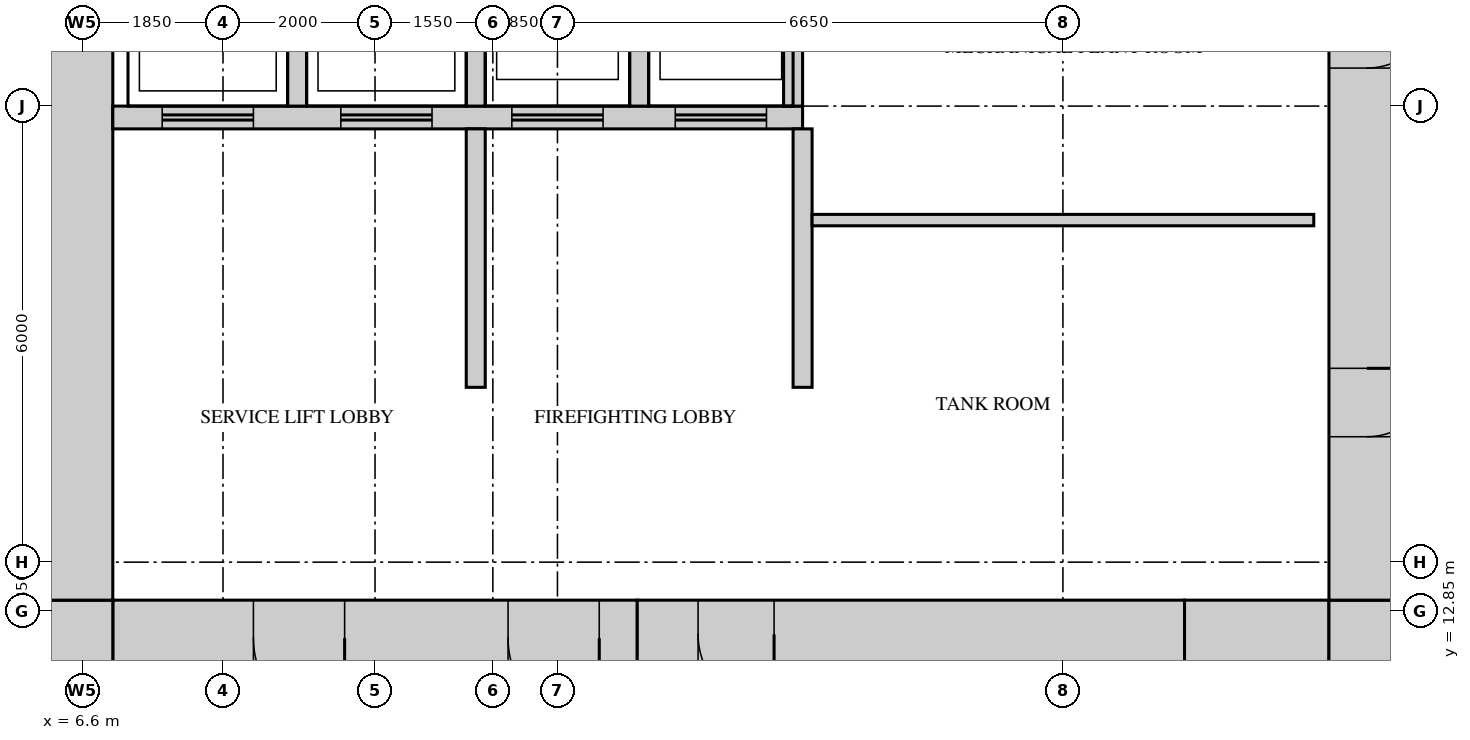
"""IFC4 building model, lengths in metres.
Left out: names, types, materials, properties, quantities, classifications, styles, units other than length and angle.
Written with IfcOpenShell. Run it as: python <this file> out.ifc"""

import sys

from ifc_helpers import new_model, si_unit, direction, frame, frame_2d, origin, place, context, subcontext, project, spatial, rectangle, extrude, source, transform, mapped, element, fill, save


model = new_model("IFC4")
c1 = context("Model", 3, precision=1e-05, world=origin(), true_north=direction((0.0, 1.0)))
c2 = subcontext(c1, "Body", "Model", "MODEL_VIEW")
j1 = project(units=[si_unit("LENGTHUNIT", "METRE"), si_unit("PLANEANGLEUNIT", "RADIAN")], contexts=[c1])
p1 = place(None, origin())
s1 = spatial("IfcSite", under=j1, at=p1, CompositionType="ELEMENT")
p2 = place(p1, origin())
s2 = spatial("IfcBuilding", under=s1, at=p2, CompositionType="ELEMENT")
p3 = place(p2, frame((0.0, 0.0, 114.7)))
s3 = spatial("IfcBuildingStorey", under=s2, at=p3, CompositionType="ELEMENT", Elevation=114.7)
m1 = source(origin(), c2, "Body", "SweptSolid", [
    extrude(rectangle(XDim=6.9, YDim=1.0, at=frame_2d((3.45, 0.0))), origin(), (0.0, 0.0, 1.0), 4.1),
])
p4 = place(p3, frame((7.0, 12.5, 0.0), z_axis=(0.0, 0.0, 1.0), x_axis=(1.0, 0.0, 0.0)))
e1 = element("IfcWall", 1, at=p4, inside=s3, PredefinedType="SHEAR", context=c2, shape_type="MappedRepresentation", body=[
    mapped(m1, transform((0.0, 0.0, 0.0))),
])
m2 = source(origin(), c2, "Body", "SweptSolid", [
    extrude(rectangle(XDim=1.2, YDim=2.1, at=frame_2d((0.6, 1.05))), frame((0.0, 0.51, 0.0), z_axis=(0.0, -1.0, 0.0), x_axis=(1.0, 0.0, 0.0)), (0.0, 0.0, 1.0), 1.02),
])
p5 = place(p4, frame((5.2, 0.0, 0.0)))
e2 = element("IfcOpeningElement", 2, at=p5, cuts=e1, PredefinedType="OPENING", context=c2, shape_type="MappedRepresentation", body=[
    mapped(m2, transform((0.0, 0.0, 0.0))),
])
p6 = place(p4, frame((1.85, 0.0, 0.0)))
e3 = element("IfcOpeningElement", 3, at=p6, cuts=e1, PredefinedType="OPENING", context=c2, shape_type="MappedRepresentation", body=[
    mapped(m2, transform((0.0, 0.0, 0.0))),
])
m3 = source(origin(), c2, "Body", "SweptSolid", [
    extrude(rectangle(XDim=7.2, YDim=0.9, at=frame_2d((3.6, 0.0))), origin(), (0.0, 0.0, 1.0), 4.1),
])
p7 = place(p3, frame((13.9, 12.55, 0.0), z_axis=(0.0, 0.0, 1.0), x_axis=(1.0, 0.0, 0.0)))
e4 = element("IfcWall", 4, at=p7, inside=s3, PredefinedType="SHEAR", context=c2, shape_type="MappedRepresentation", body=[
    mapped(m3, transform((0.0, 0.0, 0.0))),
])
m4 = source(origin(), c2, "Body", "SweptSolid", [
    extrude(rectangle(XDim=1.0, YDim=2.1, at=frame_2d((0.5, 1.05))), frame((0.0, 0.46, 0.0), z_axis=(0.0, -1.0, 0.0), x_axis=(1.0, 0.0, 0.0)), (0.0, 0.0, 1.0), 0.92),
])
p8 = place(p7, frame((0.8, 0.0, 0.0)))
e5 = element("IfcOpeningElement", 5, at=p8, cuts=e4, PredefinedType="OPENING", context=c2, shape_type="MappedRepresentation", body=[
    mapped(m4, transform((0.0, 0.0, 0.0))),
])
m5 = source(origin(), c2, "Body", "SweptSolid", [
    extrude(rectangle(XDim=1.9, YDim=1.0, at=frame_2d((0.95, 0.0))), origin(), (0.0, 0.0, 1.0), 4.1),
])
p9 = place(p3, frame((21.1, 12.5, 0.0), z_axis=(0.0, 0.0, 1.0), x_axis=(1.0, 0.0, 0.0)))
e6 = element("IfcWall", 6, at=p9, inside=s3, PredefinedType="SHEAR", context=c2, shape_type="MappedRepresentation", body=[
    mapped(m5, transform((0.0, 0.0, 0.0))),
])
m6 = source(origin(), c2, "Body", "SweptSolid", [
    extrude(rectangle(XDim=1.0, YDim=1.0, at=frame_2d((0.5, 0.0))), origin(), (0.0, 0.0, 1.0), 4.1),
])
for number, where, z_axis, x_axis in (
    (7, (23.0, 12.5, 0.0), (0.0, 0.0, 1.0), (1.0, 0.0, 0.0)),
    (8, (6.0, 12.5, 0.0), (0.0, 0.0, 1.0), (1.0, 0.0, 0.0)),
):
    element("IfcWall", number, at=place(p3, frame(where, z_axis=z_axis, x_axis=x_axis)), inside=s3, PredefinedType="SHEAR", context=c2, shape_type="MappedRepresentation", body=[
        mapped(m6, transform((0.0, 0.0, 0.0))),
    ])
m7 = source(origin(), c2, "Body", "SweptSolid", [
    extrude(rectangle(XDim=28.0, YDim=1.0, at=frame_2d((14.0, 0.0))), origin(), (0.0, 0.0, 1.0), 4.1),
])
p10 = place(p3, frame((23.5, 13.0, 0.0), z_axis=(0.0, 0.0, 1.0), x_axis=(0.0, 1.0, 0.0)))
e9 = element("IfcWall", 9, at=p10, inside=s3, PredefinedType="SHEAR", context=c2, shape_type="MappedRepresentation", body=[
    mapped(m7, transform((0.0, 0.0, 0.0))),
])
m8 = source(origin(), c2, "Body", "SweptSolid", [
    extrude(rectangle(XDim=1.8, YDim=2.1, at=frame_2d((0.9, 1.05))), frame((0.0, 0.51, 0.0), z_axis=(0.0, -1.0, 0.0), x_axis=(1.0, 0.0, 0.0)), (0.0, 0.0, 1.0), 1.02),
])
p11 = place(p10, frame((22.6, 0.0, 0.0)))
e10 = element("IfcOpeningElement", 10, at=p11, cuts=e9, PredefinedType="OPENING", context=c2, shape_type="MappedRepresentation", body=[
    mapped(m8, transform((0.0, 0.0, 0.0))),
])
p12 = place(p10, frame((13.85, 0.0, 0.0)))
e11 = element("IfcOpeningElement", 11, at=p12, cuts=e9, PredefinedType="OPENING", context=c2, shape_type="MappedRepresentation", body=[
    mapped(m2, transform((0.0, 0.0, 0.0))),
])
m9 = source(origin(), c2, "Body", "SweptSolid", [
    extrude(rectangle(XDim=0.9, YDim=2.1, at=frame_2d((0.45, 1.05))), frame((0.0, 0.51, 0.0), z_axis=(0.0, -1.0, 0.0), x_axis=(1.0, 0.0, 0.0)), (0.0, 0.0, 1.0), 1.02),
])
p13 = place(p10, frame((2.15, 0.0, 0.0)))
e12 = element("IfcOpeningElement", 12, at=p13, cuts=e9, PredefinedType="OPENING", context=c2, shape_type="MappedRepresentation", body=[
    mapped(m9, transform((0.0, 0.0, 0.0))),
])
p14 = place(p10, frame((7.0, 0.0, 0.0)))
e13 = element("IfcOpeningElement", 13, at=p14, cuts=e9, PredefinedType="OPENING", context=c2, shape_type="MappedRepresentation", body=[
    mapped(m9, transform((0.0, 0.0, 0.0))),
])
p15 = place(p3, frame((6.5, 13.0, 0.0), z_axis=(0.0, 0.0, 1.0), x_axis=(0.0, 1.0, 0.0)))
e14 = element("IfcWall", 14, at=p15, inside=s3, PredefinedType="SHEAR", context=c2, shape_type="MappedRepresentation", body=[
    mapped(m7, transform((0.0, 0.0, 0.0))),
])
m10 = source(origin(), c2, "Body", "SweptSolid", [
    extrude(rectangle(XDim=9.075, YDim=0.3, at=frame_2d((4.538, 0.0))), origin(), (0.0, 0.0, 1.0), 4.1),
])
p16 = place(p3, frame((7.0, 19.35, 0.0), z_axis=(0.0, 0.0, 1.0), x_axis=(1.0, 0.0, 0.0)))
e15 = element("IfcWall", 15, at=p16, inside=s3, PredefinedType="STANDARD", context=c2, shape_type="MappedRepresentation", body=[
    mapped(m10, transform((0.0, 0.0, 0.0))),
])
m11 = source(origin(), c2, "Body", "SweptSolid", [
    extrude(rectangle(XDim=1.2, YDim=2.1, at=frame_2d((0.6, 1.05))), frame((0.0, 0.16, 0.0), z_axis=(0.0, -1.0, 0.0), x_axis=(1.0, 0.0, 0.0)), (0.0, 0.0, 1.0), 0.32),
])
p17 = place(p16, frame((0.65, 0.0, 0.0)))
e16 = element("IfcOpeningElement", 16, at=p17, cuts=e15, PredefinedType="OPENING", context=c2, shape_type="MappedRepresentation", body=[
    mapped(m11, transform((0.0, 0.0, 0.0))),
])
p18 = place(p16, frame((3.0, 0.0, 0.0)))
e17 = element("IfcOpeningElement", 17, at=p18, cuts=e15, PredefinedType="OPENING", context=c2, shape_type="MappedRepresentation", body=[
    mapped(m11, transform((0.0, 0.0, 0.0))),
])
p19 = place(p16, frame((5.25, 0.0, 0.0)))
e18 = element("IfcOpeningElement", 18, at=p19, cuts=e15, PredefinedType="OPENING", context=c2, shape_type="MappedRepresentation", body=[
    mapped(m11, transform((0.0, 0.0, 0.0))),
])
p20 = place(p16, frame((7.4, 0.0, 0.0)))
e19 = element("IfcOpeningElement", 19, at=p20, cuts=e15, PredefinedType="OPENING", context=c2, shape_type="MappedRepresentation", body=[
    mapped(m11, transform((0.0, 0.0, 0.0))),
])
m12 = source(origin(), c2, "Body", "SweptSolid", [
    extrude(rectangle(XDim=3.1, YDim=0.25, at=frame_2d((1.55, 0.0))), origin(), (0.0, 0.0, 1.0), 4.1),
])
for number, where, z_axis, x_axis in (
    (20, (9.425, 19.5, 0.0), (0.0, 0.0, 1.0), (0.0, 1.0, 0.0)),
    (21, (11.775, 19.5, 0.0), (0.0, 0.0, 1.0), (0.0, 1.0, 0.0)),
    (22, (13.925, 19.5, 0.0), (0.0, 0.0, 1.0), (0.0, 1.0, 0.0)),
    (23, (15.95, 19.5, 0.0), (0.0, 0.0, 1.0), (0.0, 1.0, 0.0)),
):
    element("IfcWall", number, at=place(p3, frame(where, z_axis=z_axis, x_axis=x_axis)), inside=s3, PredefinedType="STANDARD", context=c2, shape_type="MappedRepresentation", body=[
        mapped(m12, transform((0.0, 0.0, 0.0))),
    ])
m13 = source(origin(), c2, "Body", "SweptSolid", [
    extrude(rectangle(XDim=3.4, YDim=0.25, at=frame_2d((1.7, 0.0))), origin(), (0.0, 0.0, 1.0), 4.1),
])
for number, where, z_axis, x_axis in (
    (24, (16.075, 15.8, 0.0), (0.0, 0.0, 1.0), (0.0, 1.0, 0.0)),
    (25, (11.775, 15.8, 0.0), (0.0, 0.0, 1.0), (0.0, 1.0, 0.0)),
):
    element("IfcWall", number, at=place(p3, frame(where, z_axis=z_axis, x_axis=x_axis)), inside=s3, PredefinedType="STANDARD", context=c2, shape_type="MappedRepresentation", body=[
        mapped(m13, transform((0.0, 0.0, 0.0))),
    ])
m14 = source(origin(), c2, "Body", "SweptSolid", [
    extrude(rectangle(XDim=6.6, YDim=0.15, at=frame_2d((3.3, 0.0))), origin(), (0.0, 0.0, 1.0), 4.2),
])
p21 = place(p3, frame((16.2, 18.0, 0.0), z_axis=(0.0, 0.0, 1.0), x_axis=(1.0, 0.0, 0.0)))
e26 = element("IfcWall", 26, at=p21, inside=s3, PredefinedType="PARTITIONING", context=c2, shape_type="MappedRepresentation", body=[
    mapped(m14, transform((0.0, 0.0, 0.0))),
])
m15 = source(origin(), c2, "Body", "SweptSolid", [
    extrude(rectangle(XDim=0.9, YDim=2.1, at=frame_2d((0.45, 1.05))), frame((0.0, 0.45, 0.0), z_axis=(0.0, -1.0, 0.0), x_axis=(1.0, 0.0, 0.0)), (0.0, 0.0, 1.0), 0.9),
])
p22 = place(p13, origin())
e27 = element("IfcDoor", 27, at=p22, inside=s3, OperationType="SINGLE_SWING_RIGHT", PredefinedType="DOOR", context=c2, shape_type="MappedRepresentation", body=[
    mapped(m15, transform((0.0, 0.0, 0.0))),
])
fill(e12, e27)
p23 = place(p14, origin())
e28 = element("IfcDoor", 28, at=p23, inside=s3, OperationType="SINGLE_SWING_RIGHT", PredefinedType="DOOR", context=c2, shape_type="MappedRepresentation", body=[
    mapped(m15, transform((0.0, 0.0, 0.0))),
])
fill(e13, e28)
m16 = source(origin(), c2, "Body", "SweptSolid", [
    extrude(rectangle(XDim=1.2, YDim=2.1, at=frame_2d((0.6, 1.05))), frame((0.0, 0.45, 0.0), z_axis=(0.0, -1.0, 0.0), x_axis=(1.0, 0.0, 0.0)), (0.0, 0.0, 1.0), 0.9),
])
p24 = place(p5, origin())
e29 = element("IfcDoor", 29, at=p24, inside=s3, OperationType="SINGLE_SWING_RIGHT", PredefinedType="DOOR", context=c2, shape_type="MappedRepresentation", body=[
    mapped(m16, transform((0.0, 0.0, 0.0))),
])
fill(e2, e29)
p25 = place(p6, origin())
e30 = element("IfcDoor", 30, at=p25, inside=s3, OperationType="SINGLE_SWING_RIGHT", PredefinedType="DOOR", context=c2, shape_type="MappedRepresentation", body=[
    mapped(m16, transform((0.0, 0.0, 0.0))),
])
fill(e3, e30)
m17 = source(origin(), c2, "Body", "SweptSolid", [
    extrude(rectangle(XDim=1.0, YDim=2.1, at=frame_2d((0.5, 1.05))), frame((0.0, 0.4, 0.0), z_axis=(0.0, -1.0, 0.0), x_axis=(1.0, 0.0, 0.0)), (0.0, 0.0, 1.0), 0.8),
])
p26 = place(p8, origin())
e31 = element("IfcDoor", 31, at=p26, inside=s3, OperationType="SINGLE_SWING_RIGHT", PredefinedType="DOOR", context=c2, shape_type="MappedRepresentation", body=[
    mapped(m17, transform((0.0, 0.0, 0.0))),
])
fill(e5, e31)
m18 = source(origin(), c2, "Body", "SweptSolid", [
    extrude(rectangle(XDim=1.2, YDim=2.1, at=frame_2d((0.6, 1.05))), frame((0.0, 0.025, 0.0), z_axis=(0.0, -1.0, 0.0), x_axis=(1.0, 0.0, 0.0)), (0.0, 0.0, 1.0), 0.05),
])
p27 = place(p17, origin())
e32 = element("IfcDoor", 32, at=p27, inside=s3, OperationType="DOUBLE_DOOR_SLIDING", PredefinedType="DOOR", context=c2, shape_type="MappedRepresentation", body=[
    mapped(m18, transform((0.0, 0.0, 0.0))),
])
fill(e16, e32)
p28 = place(p18, origin())
e33 = element("IfcDoor", 33, at=p28, inside=s3, OperationType="DOUBLE_DOOR_SLIDING", PredefinedType="DOOR", context=c2, shape_type="MappedRepresentation", body=[
    mapped(m18, transform((0.0, 0.0, 0.0))),
])
fill(e17, e33)
p29 = place(p19, origin())
e34 = element("IfcDoor", 34, at=p29, inside=s3, OperationType="DOUBLE_DOOR_SLIDING", PredefinedType="DOOR", context=c2, shape_type="MappedRepresentation", body=[
    mapped(m18, transform((0.0, 0.0, 0.0))),
])
fill(e18, e34)
p30 = place(p20, origin())
e35 = element("IfcDoor", 35, at=p30, inside=s3, OperationType="DOUBLE_DOOR_SLIDING", PredefinedType="DOOR", context=c2, shape_type="MappedRepresentation", body=[
    mapped(m18, transform((0.0, 0.0, 0.0))),
])
fill(e19, e35)
save(model, sys.argv[1])
